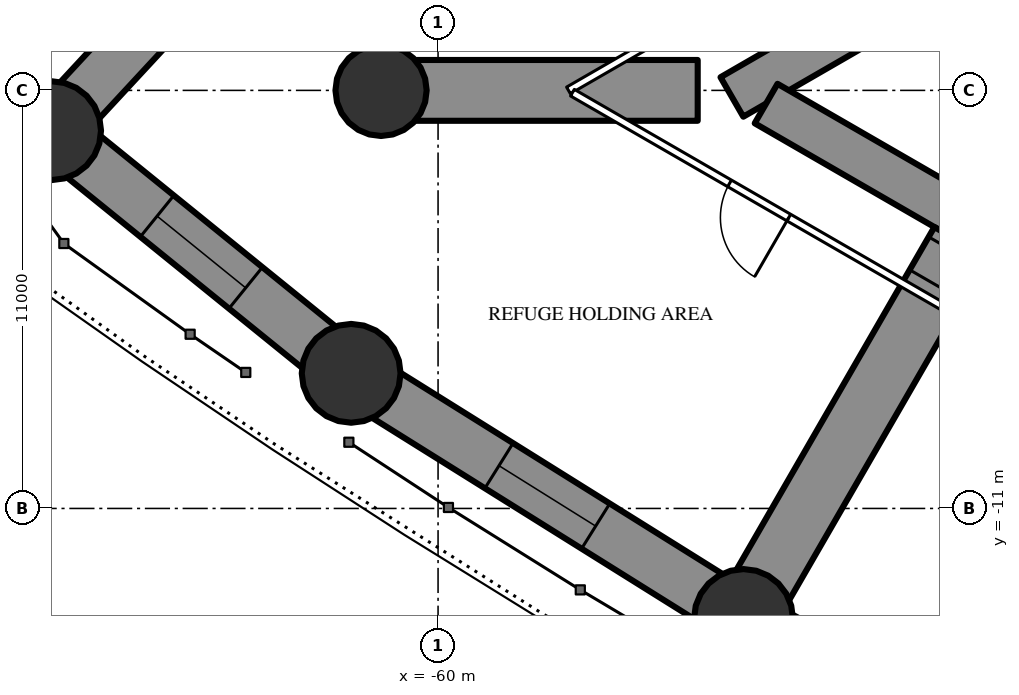
"""IFC4 building model, lengths in metres.
Left out: names, types, materials, properties, quantities, classifications, styles, units other than length and angle.
Written with IfcOpenShell. Run it as: python <this file> out.ifc"""

import sys

from ifc_helpers import new_model, si_unit, direction, frame, frame_2d, origin, origin_2d, place, context, subcontext, project, spatial, rectangle, circle, hollow_circle, extrude, element, fill, save


model = new_model("IFC4")
c1 = context("Model", 3, precision=1e-05, world=origin(), true_north=direction((0.0, 1.0)))
c2 = subcontext(c1, "Body", "Model", "MODEL_VIEW")
j1 = project(units=[si_unit("LENGTHUNIT", "METRE"), si_unit("PLANEANGLEUNIT", "RADIAN")], contexts=[c1])
p1 = place(None, origin())
s1 = spatial("IfcSite", under=j1, at=p1, CompositionType="ELEMENT")
p2 = place(p1, origin())
s2 = spatial("IfcBuilding", under=s1, at=p2, CompositionType="ELEMENT")
p3 = place(p2, frame((0.0, 0.0, 87.0)))
s3 = spatial("IfcBuildingStorey", under=s2, at=p3, CompositionType="ELEMENT", Elevation=87.0)
for number, where, z_axis, x_axis in (
    (1, (-70.168, -1.06, 0.0), (0.0, 0.0, 1.0), (1.0, 0.0, 0.0)),
    (2, (-62.287, -7.445, 0.0), (0.0, 0.0, 1.0), (1.0, 0.0, 0.0)),
    (3, (-51.963, -13.895, 0.0), (0.0, 0.0, 1.0), (1.0, 0.0, 0.0)),
):
    element("IfcColumn", number, at=place(p3, frame(where, z_axis=z_axis, x_axis=x_axis)), inside=s3, PredefinedType="COLUMN", context=c2, shape_type="SweptSolid", body=[
        extrude(hollow_circle(Radius=1.3, WallThickness=0.1, at=origin_2d()), origin(), (0.0, 0.0, 1.0), 3.6),
    ])
p4 = place(p3, frame((-61.5, 0.0, 0.0), z_axis=(0.0, 0.0, 1.0), x_axis=(1.0, 0.0, 0.0)))
e4 = element("IfcColumn", 4, at=p4, inside=s3, PredefinedType="COLUMN", context=c2, shape_type="SweptSolid", body=[
    extrude(circle(Radius=1.2, at=origin_2d()), origin(), (0.0, 0.0, 1.0), 3.6),
])
p5 = place(p3, frame((-27.2, 14.3, 0.0), z_axis=(0.0, 0.0, 1.0), x_axis=(-0.866026593062, -0.499997940104, 0.0)))
e5 = element("IfcWall", 5, at=p5, inside=s3, PredefinedType="SHEAR", context=c2, shape_type="SweptSolid", body=[
    extrude(rectangle(XDim=28.946, YDim=1.2, at=frame_2d((14.473, 0.0))), origin(), (0.0, 0.0, 1.0), 3.6),
])
p6 = place(p5, frame((4.6, 0.0, 0.0)))
e6 = element("IfcOpeningElement", 6, at=p6, cuts=e5, PredefinedType="OPENING", context=c2, shape_type="SweptSolid", body=[
    extrude(rectangle(XDim=1.0, YDim=2.2, at=frame_2d((0.5, 1.1))), frame((0.0, 0.61, 0.0), z_axis=(0.0, -1.0, 0.0), x_axis=(1.0, 0.0, 0.0)), (0.0, 0.0, 1.0), 1.22),
])
p7 = place(p5, frame((13.568, 0.0, 0.0)))
e7 = element("IfcOpeningElement", 7, at=p7, cuts=e5, PredefinedType="OPENING", context=c2, shape_type="SweptSolid", body=[
    extrude(rectangle(XDim=1.8, YDim=2.03, at=frame_2d((0.9, 1.015))), frame((0.0, 0.61, 0.0), z_axis=(0.0, -1.0, 0.0), x_axis=(1.0, 0.0, 0.0)), (0.0, 0.0, 1.0), 1.22),
])
p8 = place(p3, frame((-27.2, -14.3, 0.0), z_axis=(0.0, 0.0, 1.0), x_axis=(-0.866024021859, 0.500002393557, 0.0)))
e8 = element("IfcWall", 8, at=p8, inside=s3, PredefinedType="SHEAR", context=c2, shape_type="SweptSolid", body=[
    extrude(rectangle(XDim=27.907, YDim=1.2, at=frame_2d((13.954, 0.0))), origin(), (0.0, 0.0, 1.0), 3.6),
])
p9 = place(p8, frame((4.6, 0.0, 0.0)))
e9 = element("IfcOpeningElement", 9, at=p9, cuts=e8, PredefinedType="OPENING", context=c2, shape_type="SweptSolid", body=[
    extrude(rectangle(XDim=1.0, YDim=2.2, at=frame_2d((0.5, 1.1))), frame((0.0, 0.61, 0.0), z_axis=(0.0, -1.0, 0.0), x_axis=(1.0, 0.0, 0.0)), (0.0, 0.0, 1.0), 1.22),
])
p10 = place(p8, frame((13.818, 0.0, 0.0)))
e10 = element("IfcOpeningElement", 10, at=p10, cuts=e8, PredefinedType="OPENING", context=c2, shape_type="SweptSolid", body=[
    extrude(rectangle(XDim=1.8, YDim=2.2, at=frame_2d((0.9, 1.1))), frame((0.0, 0.61, 0.0), z_axis=(0.0, -1.0, 0.0), x_axis=(1.0, 0.0, 0.0)), (0.0, 0.0, 1.0), 1.22),
])
p11 = place(p3, frame((-53.168, 0.0, 0.0), z_axis=(0.0, 0.0, 1.0), x_axis=(-1.0, 0.0, 0.0)))
e11 = element("IfcWall", 11, at=p11, inside=s3, PredefinedType="SHEAR", context=c2, shape_type="SweptSolid", body=[
    extrude(rectangle(XDim=8.332, YDim=1.6, at=frame_2d((4.166, 0.0))), origin(), (0.0, 0.0, 1.0), 3.6),
])
p12 = place(p3, frame((-46.248, -3.996, 0.0), z_axis=(0.0, 0.0, 1.0), x_axis=(-0.499993613132, -0.866029091213, 0.0)))
e12 = element("IfcWall", 12, at=p12, inside=s3, PredefinedType="SHEAR", context=c2, shape_type="SweptSolid", body=[
    extrude(rectangle(XDim=11.431, YDim=1.6, at=frame_2d((5.715, 0.0))), origin(), (0.0, 0.0, 1.0), 3.6),
])
p13 = place(p12, frame((0.3, 0.0, 0.0)))
e13 = element("IfcOpeningElement", 13, at=p13, cuts=e12, PredefinedType="OPENING", context=c2, shape_type="SweptSolid", body=[
    extrude(rectangle(XDim=1.0, YDim=2.2, at=frame_2d((0.5, 1.1))), frame((0.0, 0.81, 0.0), z_axis=(0.0, -1.0, 0.0), x_axis=(1.0, 0.0, 0.0)), (0.0, 0.0, 1.0), 1.62),
])
p14 = place(p3, frame((-62.287, 7.445, 0.0), z_axis=(0.0, 0.0, 1.0), x_axis=(-0.679718253794, -0.733473309303, 0.0)))
e14 = element("IfcWall", 14, at=p14, inside=s3, PredefinedType="SHEAR", context=c2, shape_type="SweptSolid", body=[
    extrude(rectangle(XDim=11.595, YDim=1.4, at=frame_2d((5.797, 0.0))), origin(), (0.0, 0.0, 1.0), 3.6),
])
p15 = place(p14, frame((4.298, 0.0, 0.6)))
e15 = element("IfcOpeningElement", 15, at=p15, cuts=e14, PredefinedType="OPENING", context=c2, shape_type="SweptSolid", body=[
    extrude(rectangle(XDim=3.0, YDim=1.2, at=frame_2d((1.5, 0.6))), frame((0.0, 0.71, 0.0), z_axis=(0.0, -1.0, 0.0), x_axis=(1.0, 0.0, 0.0)), (0.0, 0.0, 1.0), 1.42),
])
p16 = place(p3, frame((-70.168, -1.06, 0.0), z_axis=(0.0, 0.0, 1.0), x_axis=(0.777033503891, -0.629459239213, 0.0)))
e16 = element("IfcWall", 16, at=p16, inside=s3, PredefinedType="SHEAR", context=c2, shape_type="SweptSolid", body=[
    extrude(rectangle(XDim=10.143, YDim=1.4, at=frame_2d((5.071, 0.0))), origin(), (0.0, 0.0, 1.0), 3.6),
])
p17 = place(p16, frame((3.572, 0.0, 0.6)))
e17 = element("IfcOpeningElement", 17, at=p17, cuts=e16, PredefinedType="OPENING", context=c2, shape_type="SweptSolid", body=[
    extrude(rectangle(XDim=3.0, YDim=1.2, at=frame_2d((1.5, 0.6))), frame((0.0, 0.71, 0.0), z_axis=(0.0, -1.0, 0.0), x_axis=(1.0, 0.0, 0.0)), (0.0, 0.0, 1.0), 1.42),
])
p18 = place(p3, frame((-62.287, -7.445, 0.0), z_axis=(0.0, 0.0, 1.0), x_axis=(0.848062521637, -0.529896177939, 0.0)))
e18 = element("IfcWall", 18, at=p18, inside=s3, PredefinedType="SHEAR", context=c2, shape_type="SweptSolid", body=[
    extrude(rectangle(XDim=12.173, YDim=1.4, at=frame_2d((6.086, 0.0))), origin(), (0.0, 0.0, 1.0), 3.6),
])
p19 = place(p18, frame((4.586, 0.0, 0.6)))
e19 = element("IfcOpeningElement", 19, at=p19, cuts=e18, PredefinedType="OPENING", context=c2, shape_type="SweptSolid", body=[
    extrude(rectangle(XDim=3.0, YDim=1.2, at=frame_2d((1.5, 0.6))), frame((0.0, 0.71, 0.0), z_axis=(0.0, -1.0, 0.0), x_axis=(1.0, 0.0, 0.0)), (0.0, 0.0, 1.0), 1.42),
])
p20 = place(p3, frame((-51.963, -13.895, 0.0), z_axis=(0.0, 0.0, 1.0), x_axis=(0.880492350889, -0.474060354835, 0.0)))
e20 = element("IfcWall", 20, at=p20, inside=s3, PredefinedType="SHEAR", context=c2, shape_type="SweptSolid", body=[
    extrude(rectangle(XDim=12.173, YDim=1.4, at=frame_2d((6.086, 0.0))), origin(), (0.0, 0.0, 1.0), 3.6),
])
p21 = place(p20, frame((4.586, 0.0, 0.6)))
e21 = element("IfcOpeningElement", 21, at=p21, cuts=e20, PredefinedType="OPENING", context=c2, shape_type="SweptSolid", body=[
    extrude(rectangle(XDim=3.0, YDim=1.2, at=frame_2d((1.5, 0.6))), frame((0.0, 0.71, 0.0), z_axis=(0.0, -1.0, 0.0), x_axis=(1.0, 0.0, 0.0)), (0.0, 0.0, 1.0), 1.42),
])
p22 = place(p3, frame((-37.7, 10.894, 0.0), z_axis=(0.0, 0.0, 1.0), x_axis=(-0.866027905338, -0.499995667157, 0.0)))
e22 = element("IfcWall", 22, at=p22, inside=s3, PredefinedType="PARTITIONING", context=c2, shape_type="SweptSolid", body=[
    extrude(rectangle(XDim=21.787, YDim=0.2, at=frame_2d((10.894, 0.0))), origin(), (0.0, 0.0, 1.0), 3.35),
])
p23 = place(p22, frame((15.094, 0.0, 0.0)))
e23 = element("IfcOpeningElement", 23, at=p23, cuts=e22, PredefinedType="OPENING", context=c2, shape_type="SweptSolid", body=[
    extrude(rectangle(XDim=1.8, YDim=2.2, at=frame_2d((0.9, 1.1))), frame((0.0, 0.11, 0.0), z_axis=(0.0, -1.0, 0.0), x_axis=(1.0, 0.0, 0.0)), (0.0, 0.0, 1.0), 0.22),
])
p24 = place(p22, frame((4.201, 0.0, 0.0)))
e24 = element("IfcOpeningElement", 24, at=p24, cuts=e22, PredefinedType="OPENING", context=c2, shape_type="SweptSolid", body=[
    extrude(rectangle(XDim=1.8, YDim=2.2, at=frame_2d((0.9, 1.1))), frame((0.0, 0.11, 0.0), z_axis=(0.0, -1.0, 0.0), x_axis=(1.0, 0.0, 0.0)), (0.0, 0.0, 1.0), 0.22),
])
p25 = place(p3, frame((-36.92, -11.344, 0.0), z_axis=(0.0, 0.0, 1.0), x_axis=(-0.866028313256, 0.499994960614, 0.0)))
e25 = element("IfcWall", 25, at=p25, inside=s3, PredefinedType="PARTITIONING", context=c2, shape_type="SweptSolid", body=[
    extrude(rectangle(XDim=22.568, YDim=0.2, at=frame_2d((11.284, 0.0))), origin(), (0.0, 0.0, 1.0), 3.35),
])
p26 = place(p25, frame((15.994, 0.0, 0.0)))
e26 = element("IfcOpeningElement", 26, at=p26, cuts=e25, PredefinedType="OPENING", context=c2, shape_type="SweptSolid", body=[
    extrude(rectangle(XDim=1.8, YDim=2.2, at=frame_2d((0.9, 1.1))), frame((0.0, 0.11, 0.0), z_axis=(0.0, -1.0, 0.0), x_axis=(1.0, 0.0, 0.0)), (0.0, 0.0, 1.0), 0.22),
])
p27 = place(p25, frame((4.551, 0.0, 0.0)))
e27 = element("IfcOpeningElement", 27, at=p27, cuts=e25, PredefinedType="OPENING", context=c2, shape_type="SweptSolid", body=[
    extrude(rectangle(XDim=2.0, YDim=2.4, at=frame_2d((1.0, 1.2))), frame((0.0, 0.11, 0.0), z_axis=(0.0, -1.0, 0.0), x_axis=(1.0, 0.0, 0.0)), (0.0, 0.0, 1.0), 0.22),
])
p28 = place(p17, origin())
e28 = element("IfcWindow", 28, at=p28, inside=s3, PartitioningType="SINGLE_PANEL", PredefinedType="WINDOW", context=c2, shape_type="SweptSolid", body=[
    extrude(rectangle(XDim=3.0, YDim=1.2, at=frame_2d((1.5, 0.6))), frame((0.0, 0.03, 0.0), z_axis=(0.0, -1.0, 0.0), x_axis=(1.0, 0.0, 0.0)), (0.0, 0.0, 1.0), 0.06),
])
fill(e17, e28)
p29 = place(p19, origin())
e29 = element("IfcWindow", 29, at=p29, inside=s3, PartitioningType="SINGLE_PANEL", PredefinedType="WINDOW", context=c2, shape_type="SweptSolid", body=[
    extrude(rectangle(XDim=3.0, YDim=1.2, at=frame_2d((1.5, 0.6))), frame((0.0, 0.03, 0.0), z_axis=(0.0, -1.0, 0.0), x_axis=(1.0, 0.0, 0.0)), (0.0, 0.0, 1.0), 0.06),
])
fill(e19, e29)
p30 = place(p13, origin())
e30 = element("IfcDoor", 30, at=p30, inside=s3, OperationType="SINGLE_SWING_LEFT", PredefinedType="DOOR", context=c2, shape_type="SweptSolid", body=[
    extrude(rectangle(XDim=1.0, YDim=2.2, at=frame_2d((0.5, 1.1))), frame((0.0, 0.025, 0.0), z_axis=(0.0, -1.0, 0.0), x_axis=(1.0, 0.0, 0.0)), (0.0, 0.0, 1.0), 0.05),
])
fill(e13, e30)
p31 = place(p26, origin())
e31 = element("IfcDoor", 31, at=p31, inside=s3, OperationType="DOUBLE_DOOR_SINGLE_SWING", PredefinedType="DOOR", context=c2, shape_type="SweptSolid", body=[
    extrude(rectangle(XDim=1.8, YDim=2.2, at=frame_2d((0.9, 1.1))), frame((0.0, 0.025, 0.0), z_axis=(0.0, -1.0, 0.0), x_axis=(1.0, 0.0, 0.0)), (0.0, 0.0, 1.0), 0.05),
])
fill(e26, e31)
save(model, sys.argv[1])
